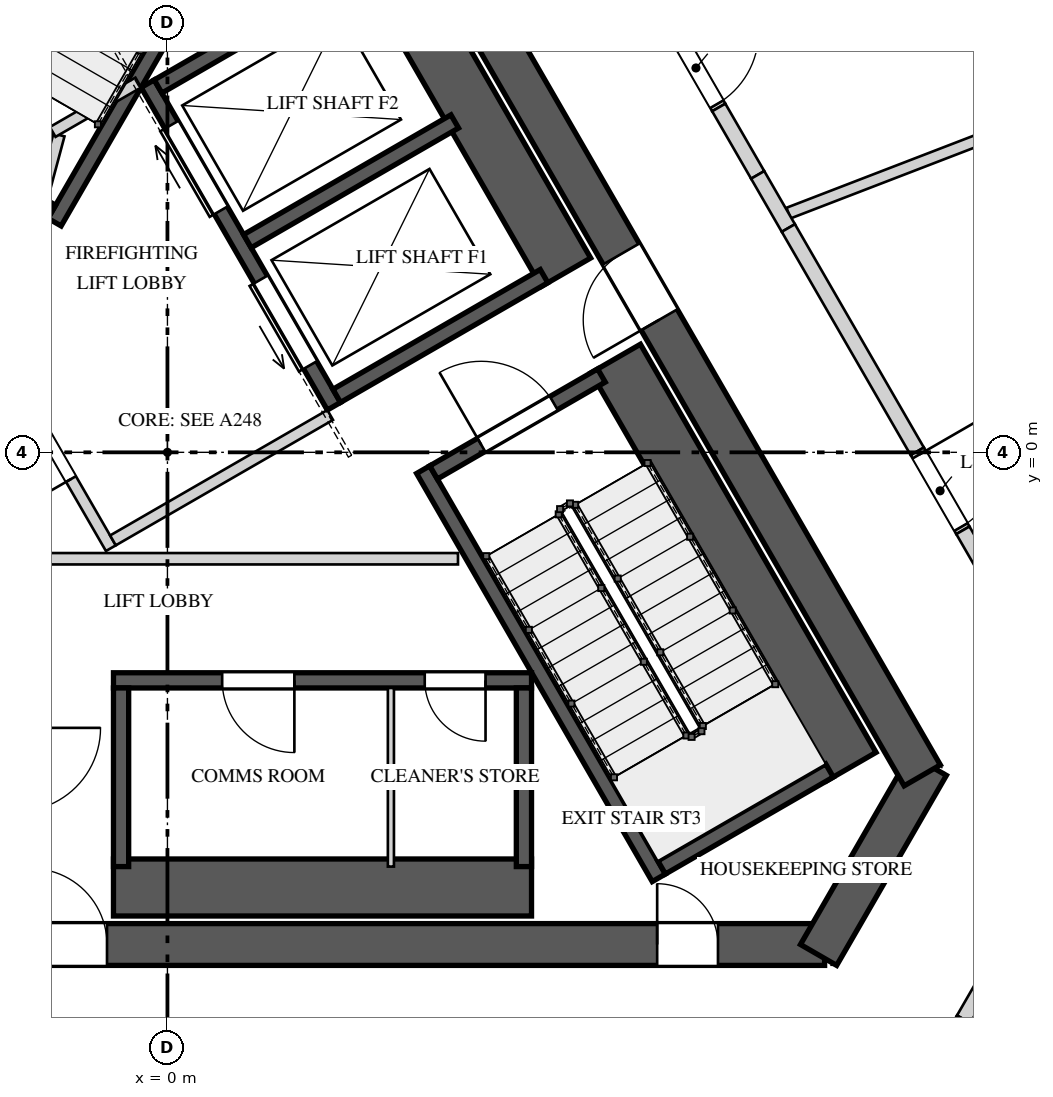
"""IFC4 building model, lengths in metres.
Left out: names, types, materials, properties, quantities, classifications, styles, units other than length and angle.
Written with IfcOpenShell. Run it as: python <this file> out.ifc"""

import sys

from ifc_helpers import new_model, si_unit, direction, frame, frame_2d, origin, place, context, subcontext, project, spatial, polyline, rectangle, outline, extrude, element, fill, save


model = new_model("IFC4")
c1 = context("Model", 3, precision=1e-05, world=origin(), true_north=direction((0.0, 1.0)))
c2 = subcontext(c1, "Body", "Model", "MODEL_VIEW")
j1 = project(units=[si_unit("LENGTHUNIT", "METRE"), si_unit("PLANEANGLEUNIT", "RADIAN")], contexts=[c1])
p1 = place(None, origin())
s1 = spatial("IfcSite", under=j1, at=p1, CompositionType="ELEMENT")
p2 = place(p1, origin())
s2 = spatial("IfcBuilding", under=s1, at=p2, CompositionType="ELEMENT")
p3 = place(p2, frame((0.0, 0.0, 365.9)))
s3 = spatial("IfcBuildingStorey", under=s2, at=p3, CompositionType="ELEMENT", Elevation=365.9)
p4 = place(p3, frame((-1.285, 10.725, 0.0), z_axis=(0.0, 0.0, 1.0), x_axis=(-0.499994590896, -0.86602852671, 0.0)))
e1 = element("IfcWall", 1, at=p4, inside=s3, PredefinedType="SHEAR", context=c2, shape_type="SweptSolid", body=[
    extrude(rectangle(XDim=17.292, YDim=0.55, at=frame_2d((8.646, 0.0))), origin(), (0.0, 0.0, 1.0), 4.5),
])
p5 = place(p4, frame((6.851, 0.0, 0.0)))
e2 = element("IfcOpeningElement", 2, at=p5, cuts=e1, PredefinedType="OPENING", context=c2, shape_type="SweptSolid", body=[
    extrude(rectangle(XDim=1.0, YDim=2.4, at=frame_2d((0.5, 1.2))), frame((0.0, 0.285, 0.0), z_axis=(0.0, -1.0, 0.0), x_axis=(1.0, 0.0, 0.0)), (0.0, 0.0, 1.0), 0.57),
])
p6 = place(p3, frame((-8.646, -6.475, 0.0), z_axis=(0.0, 0.0, 1.0), x_axis=(1.0, 0.0, 0.0)))
e3 = element("IfcWall", 3, at=p6, inside=s3, PredefinedType="SHEAR", context=c2, shape_type="SweptSolid", body=[
    extrude(rectangle(XDim=17.292, YDim=0.55, at=frame_2d((8.646, 0.0))), origin(), (0.0, 0.0, 1.0), 4.5),
])
p7 = place(p6, frame((6.851, 0.0, 0.0)))
e4 = element("IfcOpeningElement", 4, at=p7, cuts=e3, PredefinedType="OPENING", context=c2, shape_type="SweptSolid", body=[
    extrude(rectangle(XDim=1.0, YDim=2.4, at=frame_2d((0.5, 1.2))), frame((0.0, 0.285, 0.0), z_axis=(0.0, -1.0, 0.0), x_axis=(1.0, 0.0, 0.0)), (0.0, 0.0, 1.0), 0.57),
])
p8 = place(p6, frame((15.089, 0.0, 0.0)))
e5 = element("IfcOpeningElement", 5, at=p8, cuts=e3, PredefinedType="OPENING", context=c2, shape_type="SweptSolid", body=[
    extrude(rectangle(XDim=0.8, YDim=2.1, at=frame_2d((0.4, 1.05))), frame((0.0, 0.285, 0.0), z_axis=(0.0, -1.0, 0.0), x_axis=(1.0, 0.0, 0.0)), (0.0, 0.0, 1.0), 0.57),
])
p9 = place(p3, frame((8.566, -6.613, 0.0), z_axis=(0.0, 0.0, 1.0), x_axis=(0.499995765644, 0.866027848477, 0.0)))
e6 = element("IfcWall", 6, at=p9, inside=s3, PredefinedType="SHEAR", context=c2, shape_type="SweptSolid", body=[
    extrude(rectangle(XDim=2.887, YDim=0.55, at=frame_2d((1.443, 0.0))), origin(), (0.0, 0.0, 1.0), 4.5),
])
p10 = place(p3, frame((9.93, -4.25, 0.0), z_axis=(0.0, 0.0, 1.0), x_axis=(-0.499994590896, 0.86602852671, 0.0)))
e7 = element("IfcWall", 7, at=p10, inside=s3, PredefinedType="SHEAR", context=c2, shape_type="SweptSolid", body=[
    extrude(rectangle(XDim=17.292, YDim=0.55, at=frame_2d((8.646, 0.0))), origin(), (0.0, 0.0, 1.0), 4.5),
])
p11 = place(p10, frame((6.921, 0.0, 0.0)))
e8 = element("IfcOpeningElement", 8, at=p11, cuts=e7, PredefinedType="OPENING", context=c2, shape_type="SweptSolid", body=[
    extrude(rectangle(XDim=1.0, YDim=2.4, at=frame_2d((0.5, 1.2))), frame((0.0, 0.285, 0.0), z_axis=(0.0, -1.0, 0.0), x_axis=(1.0, 0.0, 0.0)), (0.0, 0.0, 1.0), 0.57),
])
p12 = place(p10, frame((14.626, 0.0, 0.0)))
e9 = element("IfcOpeningElement", 9, at=p12, cuts=e7, PredefinedType="OPENING", context=c2, shape_type="SweptSolid", body=[
    extrude(rectangle(XDim=0.8, YDim=2.1, at=frame_2d((0.4, 1.05))), frame((0.0, 0.285, 0.0), z_axis=(0.0, -1.0, 0.0), x_axis=(1.0, 0.0, 0.0)), (0.0, 0.0, 1.0), 0.57),
])
p13 = place(p3, frame((-0.918, 9.86, 0.0), z_axis=(0.0, 0.0, 1.0), x_axis=(-0.500026960575, -0.86600983753, 0.0)))
e10 = element("IfcWall", 10, at=p13, inside=s3, PredefinedType="SOLIDWALL", context=c2, shape_type="SweptSolid", body=[
    extrude(rectangle(XDim=6.2, YDim=0.75, at=frame_2d((3.1, 0.0))), origin(), (0.0, 0.0, 1.0), 4.15),
])
p14 = place(p3, frame((1.615, 8.397, 0.0), z_axis=(0.0, 0.0, 1.0), x_axis=(-0.500009909098, -0.866019682689, 0.0)))
e11 = element("IfcWall", 11, at=p14, inside=s3, PredefinedType="SOLIDWALL", context=c2, shape_type="SweptSolid", body=[
    extrude(rectangle(XDim=6.2, YDim=0.2, at=frame_2d((3.1, 0.0))), origin(), (0.0, 0.0, 1.0), 4.15),
])
p15 = place(p3, frame((-1.521, 3.165, 0.0), z_axis=(0.0, 0.0, 1.0), x_axis=(-0.866030925526, 0.499990435942, 0.0)))
e12 = element("IfcWall", 12, at=p15, inside=s3, PredefinedType="SOLIDWALL", context=c2, shape_type="SweptSolid", body=[
    extrude(rectangle(XDim=2.55, YDim=0.2, at=frame_2d((1.275, 0.0))), origin(), (0.0, 0.0, 1.0), 4.15),
])
p16 = place(p15, frame((0.725, 0.0, 0.0)))
e13 = element("IfcOpeningElement", 13, at=p16, cuts=e12, PredefinedType="OPENING", context=c2, shape_type="SweptSolid", body=[
    extrude(rectangle(XDim=1.1, YDim=2.4, at=frame_2d((0.55, 1.2))), frame((0.0, 0.11, 0.0), z_axis=(0.0, -1.0, 0.0), x_axis=(1.0, 0.0, 0.0)), (0.0, 0.0, 1.0), 0.22),
])
p17 = place(p3, frame((8.998, -4.135, 0.0), z_axis=(0.0, 0.0, 1.0), x_axis=(-0.500009909098, 0.866019682689, 0.0)))
e14 = element("IfcWall", 14, at=p17, inside=s3, PredefinedType="SOLIDWALL", context=c2, shape_type="SweptSolid", body=[
    extrude(rectangle(XDim=6.2, YDim=0.75, at=frame_2d((3.1, 0.0))), origin(), (0.0, 0.0, 1.0), 4.15),
])
p18 = place(p3, frame((6.465, -5.597, 0.0), z_axis=(0.0, 0.0, 1.0), x_axis=(-0.49998037582, 0.866036733513, 0.0)))
e15 = element("IfcWall", 15, at=p18, inside=s3, PredefinedType="SOLIDWALL", context=c2, shape_type="SweptSolid", body=[
    extrude(rectangle(XDim=6.2, YDim=0.2, at=frame_2d((3.1, 0.0))), origin(), (0.0, 0.0, 1.0), 4.15),
])
p19 = place(p3, frame((6.501, -5.461, 0.0), z_axis=(0.0, 0.0, 1.0), x_axis=(0.865989465428, 0.500062241894, 0.0)))
e16 = element("IfcWall", 16, at=p19, inside=s3, PredefinedType="SOLIDWALL", context=c2, shape_type="SweptSolid", body=[
    extrude(rectangle(XDim=2.55, YDim=0.2, at=frame_2d((1.275, 0.0))), origin(), (0.0, 0.0, 1.0), 4.15),
])
p20 = place(p3, frame((3.501, -0.265, 0.0), z_axis=(0.0, 0.0, 1.0), x_axis=(0.866030925526, 0.499990435942, 0.0)))
e17 = element("IfcWall", 17, at=p20, inside=s3, PredefinedType="SOLIDWALL", context=c2, shape_type="SweptSolid", body=[
    extrude(rectangle(XDim=2.55, YDim=0.2, at=frame_2d((1.275, 0.0))), origin(), (0.0, 0.0, 1.0), 4.15),
])
p21 = place(p20, frame((0.725, 0.0, 0.0)))
e18 = element("IfcOpeningElement", 18, at=p21, cuts=e17, PredefinedType="OPENING", context=c2, shape_type="SweptSolid", body=[
    extrude(rectangle(XDim=1.1, YDim=2.4, at=frame_2d((0.55, 1.2))), frame((0.0, 0.11, 0.0), z_axis=(0.0, -1.0, 0.0), x_axis=(1.0, 0.0, 0.0)), (0.0, 0.0, 1.0), 0.22),
])
p22 = place(p3, frame((4.79, -3.0, 0.0), z_axis=(0.0, 0.0, 1.0), x_axis=(-1.0, 0.0, 0.0)))
e19 = element("IfcWall", 19, at=p22, inside=s3, PredefinedType="SOLIDWALL", context=c2, shape_type="SweptSolid", body=[
    extrude(rectangle(XDim=5.5, YDim=0.2, at=frame_2d((2.75, 0.0))), origin(), (0.0, 0.0, 1.0), 4.15),
])
p23 = place(p22, frame((3.12, 0.0, 0.0)))
e20 = element("IfcOpeningElement", 20, at=p23, cuts=e19, PredefinedType="OPENING", context=c2, shape_type="SweptSolid", body=[
    extrude(rectangle(XDim=0.95, YDim=2.4, at=frame_2d((0.475, 1.2))), frame((0.0, 0.11, 0.0), z_axis=(0.0, -1.0, 0.0), x_axis=(1.0, 0.0, 0.0)), (0.0, 0.0, 1.0), 0.22),
])
p24 = place(p22, frame((0.605, 0.0, 0.0)))
e21 = element("IfcOpeningElement", 21, at=p24, cuts=e19, PredefinedType="OPENING", context=c2, shape_type="SweptSolid", body=[
    extrude(rectangle(XDim=0.8, YDim=2.1, at=frame_2d((0.4, 1.05))), frame((0.0, 0.11, 0.0), z_axis=(0.0, -1.0, 0.0), x_axis=(1.0, 0.0, 0.0)), (0.0, 0.0, 1.0), 0.22),
])
p25 = place(p3, frame((-0.71, -5.725, 0.0), z_axis=(0.0, 0.0, 1.0), x_axis=(1.0, 0.0, 0.0)))
e22 = element("IfcWall", 22, at=p25, inside=s3, PredefinedType="SOLIDWALL", context=c2, shape_type="SweptSolid", body=[
    extrude(rectangle(XDim=5.5, YDim=0.75, at=frame_2d((2.75, 0.0))), origin(), (0.0, 0.0, 1.0), 4.15),
])
for number, where, z_axis, x_axis in (
    (23, (-0.61, -3.1, 0.0), (0.0, 0.0, 1.0), (0.0, -1.0, 0.0)),
    (24, (4.69, -3.1, 0.0), (0.0, 0.0, 1.0), (0.0, -1.0, 0.0)),
):
    element("IfcWall", number, at=place(p3, frame(where, z_axis=z_axis, x_axis=x_axis)), inside=s3, PredefinedType="SOLIDWALL", context=c2, shape_type="SweptSolid", body=[
        extrude(rectangle(XDim=2.35, YDim=0.2, at=frame_2d((1.175, 0.0))), origin(), (0.0, 0.0, 1.0), 4.15),
    ])
p26 = place(p3, frame((2.94, -3.1, 0.0), z_axis=(0.0, 0.0, 1.0), x_axis=(0.0, -1.0, 0.0)))
e25 = element("IfcWall", 25, at=p26, inside=s3, PredefinedType="PARTITIONING", context=c2, shape_type="SweptSolid", body=[
    extrude(rectangle(XDim=2.35, YDim=0.08, at=frame_2d((1.175, 0.0))), origin(), (0.0, 0.0, 1.0), 4.15),
])
p27 = place(p3, frame((2.19, 0.606, 0.0), z_axis=(0.0, 0.0, 1.0), x_axis=(-0.500002801628, 0.866023786258, 0.0)))
e26 = element("IfcWall", 26, at=p27, inside=s3, PredefinedType="SOLIDWALL", context=c2, shape_type="SweptSolid", body=[
    extrude(rectangle(XDim=4.9, YDim=0.2, at=frame_2d((2.45, 0.0))), origin(), (0.0, 0.0, 1.0), 4.15),
])
p28 = place(p27, frame((0.625, 0.0, 0.0)))
e27 = element("IfcOpeningElement", 27, at=p28, cuts=e26, PredefinedType="OPENING", context=c2, shape_type="SweptSolid", body=[
    extrude(rectangle(XDim=1.3, YDim=2.1, at=frame_2d((0.65, 1.05))), frame((0.0, 0.11, 0.0), z_axis=(0.0, -1.0, 0.0), x_axis=(1.0, 0.0, 0.0)), (0.0, 0.0, 1.0), 0.22),
])
p29 = place(p27, frame((2.975, 0.0, 0.0)))
e28 = element("IfcOpeningElement", 28, at=p29, cuts=e26, PredefinedType="OPENING", context=c2, shape_type="SweptSolid", body=[
    extrude(rectangle(XDim=1.3, YDim=2.1, at=frame_2d((0.65, 1.05))), frame((0.0, 0.11, 0.0), z_axis=(0.0, -1.0, 0.0), x_axis=(1.0, 0.0, 0.0)), (0.0, 0.0, 1.0), 0.22),
])
p30 = place(p3, frame((5.243, 2.369, 0.0), z_axis=(0.0, 0.0, 1.0), x_axis=(-0.500002801628, 0.866023786258, 0.0)))
e29 = element("IfcWall", 29, at=p30, inside=s3, PredefinedType="SOLIDWALL", context=c2, shape_type="SweptSolid", body=[
    extrude(rectangle(XDim=4.9, YDim=0.75, at=frame_2d((2.45, 0.0))), origin(), (0.0, 0.0, 1.0), 4.15),
])
for number, where, z_axis, x_axis in (
    (30, (2.227, 0.743, 0.0), (0.0, 0.0, 1.0), (0.866, 0.5, 0.0)),
    (31, (1.052, 2.778, 0.0), (0.0, 0.0, 1.0), (0.866, 0.5, 0.0)),
    (32, (-0.123, 4.813, 0.0), (0.0, 0.0, 1.0), (0.866, 0.5, 0.0)),
):
    element("IfcWall", number, at=place(p3, frame(where, z_axis=z_axis, x_axis=x_axis)), inside=s3, PredefinedType="SOLIDWALL", context=c2, shape_type="SweptSolid", body=[
        extrude(rectangle(XDim=3.15, YDim=0.2, at=frame_2d((1.575, 0.0))), origin(), (0.0, 0.0, 1.0), 4.15),
    ])
p31 = place(p3, frame((-0.744, -1.261, 0.0), z_axis=(0.0, 0.0, 1.0), x_axis=(-0.500004234368, 0.866022959057, 0.0)))
e33 = element("IfcWall", 33, at=p31, inside=s3, PredefinedType="PARTITIONING", context=c2, shape_type="SweptSolid", body=[
    extrude(rectangle(XDim=3.125, YDim=0.15, at=frame_2d((1.562, 0.0))), origin(), (0.0, 0.0, 1.0), 4.15),
])
p32 = place(p31, frame((1.05, 0.0, 0.0)))
e34 = element("IfcOpeningElement", 34, at=p32, cuts=e33, PredefinedType="OPENING", context=c2, shape_type="SweptSolid", body=[
    extrude(rectangle(XDim=1.1, YDim=2.4, at=frame_2d((0.55, 1.2))), frame((0.0, 0.085, 0.0), z_axis=(0.0, -1.0, 0.0), x_axis=(1.0, 0.0, 0.0)), (0.0, 0.0, 1.0), 0.17),
])
p33 = place(p3, frame((-0.717, -1.159, 0.0), z_axis=(0.0, 0.0, 1.0), x_axis=(0.866008176907, 0.50002983664, 0.0)))
e35 = element("IfcWall", 35, at=p33, inside=s3, PredefinedType="PARTITIONING", context=c2, shape_type="SweptSolid", body=[
    extrude(rectangle(XDim=3.3, YDim=0.15, at=frame_2d((1.65, 0.0))), origin(), (0.0, 0.0, 1.0), 4.15),
])
p34 = place(p3, frame((-2.178, 1.372, 0.0), z_axis=(0.0, 0.0, 1.0), x_axis=(0.258808958833, 0.96592852884, 0.0)))
e36 = element("IfcWall", 36, at=p34, inside=s3, PredefinedType="PARTITIONING", context=c2, shape_type="SweptSolid", body=[
    extrude(rectangle(XDim=2.903, YDim=0.15, at=frame_2d((1.451, 0.0))), origin(), (0.0, 0.0, 1.0), 4.15),
])
p35 = place(p3, frame((-1.51, 4.215, 0.0), z_axis=(0.0, 0.0, 1.0), x_axis=(0.866085525409, 0.49989585183, 0.0)))
e37 = element("IfcWall", 37, at=p35, inside=s3, PredefinedType="PARTITIONING", context=c2, shape_type="SweptSolid", body=[
    extrude(rectangle(XDim=1.3, YDim=0.15, at=frame_2d((0.65, 0.0))), origin(), (0.0, 0.0, 1.0), 4.15),
])
p36 = place(p3, frame((-4.053, -1.4, 0.0), z_axis=(0.0, 0.0, 1.0), x_axis=(1.0, 0.0, 0.0)))
e38 = element("IfcWall", 38, at=p36, inside=s3, PredefinedType="PARTITIONING", context=c2, shape_type="SweptSolid", body=[
    extrude(rectangle(XDim=7.876, YDim=0.15, at=frame_2d((3.938, 0.0))), origin(), (0.0, 0.0, 1.0), 4.15),
])
p37 = place(p3, frame((12.8, 4.93, 0.0), z_axis=(0.0, 0.0, 1.0), x_axis=(-0.933162813033, -0.359453980884, 0.0)))
e39 = element("IfcWall", 39, at=p37, inside=s3, PredefinedType="PARTITIONING", context=c2, shape_type="SweptSolid", body=[
    extrude(rectangle(XDim=4.96, YDim=0.15, at=frame_2d((2.48, 0.0))), origin(), (0.0, 0.0, 1.0), 3.25),
])
p38 = place(p3, frame((10.825, -6.851, 0.0), z_axis=(0.0, 0.0, 1.0), x_axis=(-0.500144223137, -0.865942120504, 0.0)))
e40 = element("IfcWall", 40, at=p38, inside=s3, PredefinedType="SOLIDWALL", context=c2, shape_type="SweptSolid", body=[
    extrude(rectangle(XDim=0.701, YDim=0.2, at=frame_2d((0.351, 0.0))), origin(), (0.0, 0.0, 1.0), 3.45),
])
p39 = place(p3, frame((10.474, -7.458, 0.0), z_axis=(0.0, 0.0, 1.0), x_axis=(-0.499929168788, -0.866066294342, 0.0)))
e41 = element("IfcWall", 41, at=p39, inside=s3, PredefinedType="SOLIDWALL", context=c2, shape_type="SweptSolid", body=[
    extrude(rectangle(XDim=1.261, YDim=0.2, at=frame_2d((0.63, 0.0))), origin(), (0.0, 0.0, 1.0), 4.15),
])
p40 = place(p3, frame((6.653, 5.576, 0.0), z_axis=(0.0, 0.0, 1.0), x_axis=(0.499880961361, -0.866094119867, 0.0)))
e42 = element("IfcWall", 42, at=p40, inside=s3, PredefinedType="SOLIDWALL", context=c2, shape_type="SweptSolid", body=[
    extrude(outline(polyline([(0.0, 0.0), (1.2, 0.0), (1.2, 4.15), (0.986, 4.15), (0.986, 3.05), (0.0, 3.05), (0.0, 0.0)])), frame((0.0, 0.1, 0.0), z_axis=(0.0, -1.0, 0.0), x_axis=(1.0, 0.0, 0.0)), (0.0, 0.0, 1.0), 0.2),
])
p41 = place(p40, frame((0.05, 0.0, 0.0)))
e43 = element("IfcOpeningElement", 43, at=p41, cuts=e42, PredefinedType="OPENING", context=c2, shape_type="SweptSolid", body=[
    extrude(rectangle(XDim=1.1, YDim=2.4, at=frame_2d((0.55, 1.2))), frame((0.0, 0.11, 0.0), z_axis=(0.0, -1.0, 0.0), x_axis=(1.0, 0.0, 0.0)), (0.0, 0.0, 1.0), 0.22),
])
p42 = place(p3, frame((7.253, 4.537, 0.0), z_axis=(0.0, 0.0, 1.0), x_axis=(0.500086965421, -0.865975188453, 0.0)))
e44 = element("IfcWall", 44, at=p42, inside=s3, PredefinedType="SOLIDWALL", context=c2, shape_type="SweptSolid", body=[
    extrude(rectangle(XDim=1.024, YDim=0.2, at=frame_2d((0.512, 0.0))), origin(), (0.0, 0.0, 1.0), 4.15),
])
p43 = place(p3, frame((7.765, 3.65, 0.0), z_axis=(0.0, 0.0, 1.0), x_axis=(0.500141487433, -0.865943700565, 0.0)))
e45 = element("IfcWall", 45, at=p43, inside=s3, PredefinedType="SOLIDWALL", context=c2, shape_type="SweptSolid", body=[
    extrude(rectangle(XDim=0.807, YDim=0.2, at=frame_2d((0.403, 0.0))), origin(), (0.0, 0.0, 1.0), 3.25),
])
p44 = place(p3, frame((8.169, 2.951, 0.0), z_axis=(0.0, 0.0, 1.0), x_axis=(0.499955030392, -0.866051365443, 0.0)))
e46 = element("IfcWall", 46, at=p44, inside=s3, PredefinedType="SOLIDWALL", context=c2, shape_type="SweptSolid", body=[
    extrude(rectangle(XDim=3.392, YDim=0.2, at=frame_2d((1.696, 0.0))), origin(), (0.0, 0.0, 1.0), 4.15),
])
p45 = place(p3, frame((9.865, 0.013, 0.0), z_axis=(0.0, 0.0, 1.0), x_axis=(0.50012165622, -0.865955154139, 0.0)))
e47 = element("IfcWall", 47, at=p45, inside=s3, PredefinedType="SOLIDWALL", context=c2, shape_type="SweptSolid", body=[
    extrude(outline(polyline([(0.0, 0.0), (1.2, 0.0), (1.2, 4.15), (0.857, 4.15), (0.857, 3.45), (0.0, 3.45), (0.0, 0.0)])), frame((0.0, 0.1, 0.0), z_axis=(0.0, -1.0, 0.0), x_axis=(1.0, 0.0, 0.0)), (0.0, 0.0, 1.0), 0.2),
])
p46 = place(p45, frame((0.05, 0.0, 0.0)))
e48 = element("IfcOpeningElement", 48, at=p46, cuts=e47, PredefinedType="OPENING", context=c2, shape_type="SweptSolid", body=[
    extrude(rectangle(XDim=1.1, YDim=2.4, at=frame_2d((0.55, 1.2))), frame((0.0, 0.11, 0.0), z_axis=(0.0, -1.0, 0.0), x_axis=(1.0, 0.0, 0.0)), (0.0, 0.0, 1.0), 0.22),
])
p47 = place(p3, frame((10.465, -1.026, 0.0), z_axis=(0.0, 0.0, 1.0), x_axis=(0.499976014784, -0.866039251212, 0.0)))
e49 = element("IfcWall", 49, at=p47, inside=s3, PredefinedType="SOLIDWALL", context=c2, shape_type="SweptSolid", body=[
    extrude(rectangle(XDim=3.723, YDim=0.2, at=frame_2d((1.861, 0.0))), origin(), (0.0, 0.0, 1.0), 4.15),
])
p48 = place(p21, origin())
e50 = element("IfcDoor", 50, at=p48, inside=s3, OperationType="SINGLE_SWING_RIGHT", PredefinedType="DOOR", context=c2, shape_type="SweptSolid", body=[
    extrude(rectangle(XDim=1.1, YDim=2.4, at=frame_2d((0.55, 1.2))), frame((0.0, 0.025, 0.0), z_axis=(0.0, -1.0, 0.0), x_axis=(1.0, 0.0, 0.0)), (0.0, 0.0, 1.0), 0.05),
])
fill(e18, e50)
p49 = place(p23, origin())
e51 = element("IfcDoor", 51, at=p49, inside=s3, OperationType="SINGLE_SWING_LEFT", PredefinedType="DOOR", context=c2, shape_type="SweptSolid", body=[
    extrude(rectangle(XDim=0.95, YDim=2.4, at=frame_2d((0.475, 1.2))), frame((0.0, 0.025, 0.0), z_axis=(0.0, -1.0, 0.0), x_axis=(1.0, 0.0, 0.0)), (0.0, 0.0, 1.0), 0.05),
])
fill(e20, e51)
p50 = place(p24, origin())
e52 = element("IfcDoor", 52, at=p50, inside=s3, OperationType="SINGLE_SWING_RIGHT", PredefinedType="DOOR", context=c2, shape_type="SweptSolid", body=[
    extrude(rectangle(XDim=0.8, YDim=2.1, at=frame_2d((0.4, 1.05))), frame((0.0, 0.025, 0.0), z_axis=(0.0, -1.0, 0.0), x_axis=(1.0, 0.0, 0.0)), (0.0, 0.0, 1.0), 0.05),
])
fill(e21, e52)
p51 = place(p28, origin())
e53 = element("IfcDoor", 53, at=p51, inside=s3, OperationType="SLIDING_TO_LEFT", PredefinedType="DOOR", context=c2, shape_type="SweptSolid", body=[
    extrude(rectangle(XDim=1.3, YDim=2.1, at=frame_2d((0.65, 1.05))), frame((0.0, 0.025, 0.0), z_axis=(0.0, -1.0, 0.0), x_axis=(1.0, 0.0, 0.0)), (0.0, 0.0, 1.0), 0.05),
])
fill(e27, e53)
p52 = place(p29, origin())
e54 = element("IfcDoor", 54, at=p52, inside=s3, OperationType="SLIDING_TO_RIGHT", PredefinedType="DOOR", context=c2, shape_type="SweptSolid", body=[
    extrude(rectangle(XDim=1.3, YDim=2.1, at=frame_2d((0.65, 1.05))), frame((0.0, 0.025, 0.0), z_axis=(0.0, -1.0, 0.0), x_axis=(1.0, 0.0, 0.0)), (0.0, 0.0, 1.0), 0.05),
])
fill(e28, e54)
p53 = place(p32, origin())
e55 = element("IfcDoor", 55, at=p53, inside=s3, OperationType="SINGLE_SWING_LEFT", PredefinedType="DOOR", context=c2, shape_type="SweptSolid", body=[
    extrude(rectangle(XDim=1.1, YDim=2.4, at=frame_2d((0.55, 1.2))), frame((0.0, 0.025, 0.0), z_axis=(0.0, -1.0, 0.0), x_axis=(1.0, 0.0, 0.0)), (0.0, 0.0, 1.0), 0.05),
])
fill(e34, e55)
p54 = place(p7, origin())
e56 = element("IfcDoor", 56, at=p54, inside=s3, OperationType="SINGLE_SWING_LEFT", PredefinedType="DOOR", context=c2, shape_type="SweptSolid", body=[
    extrude(rectangle(XDim=1.0, YDim=2.4, at=frame_2d((0.5, 1.2))), frame((0.0, 0.025, 0.0), z_axis=(0.0, -1.0, 0.0), x_axis=(1.0, 0.0, 0.0)), (0.0, 0.0, 1.0), 0.05),
])
fill(e4, e56)
p55 = place(p11, origin())
e57 = element("IfcDoor", 57, at=p55, inside=s3, OperationType="SINGLE_SWING_RIGHT", PredefinedType="DOOR", context=c2, shape_type="SweptSolid", body=[
    extrude(rectangle(XDim=1.0, YDim=2.4, at=frame_2d((0.5, 1.2))), frame((0.0, 0.025, 0.0), z_axis=(0.0, -1.0, 0.0), x_axis=(1.0, 0.0, 0.0)), (0.0, 0.0, 1.0), 0.05),
])
fill(e8, e57)
p56 = place(p8, origin())
e58 = element("IfcDoor", 58, at=p56, inside=s3, OperationType="SINGLE_SWING_LEFT", PredefinedType="DOOR", context=c2, shape_type="SweptSolid", body=[
    extrude(rectangle(XDim=0.8, YDim=2.1, at=frame_2d((0.4, 1.05))), frame((0.0, 0.025, 0.0), z_axis=(0.0, -1.0, 0.0), x_axis=(1.0, 0.0, 0.0)), (0.0, 0.0, 1.0), 0.05),
])
fill(e5, e58)
p57 = place(p41, origin())
e59 = element("IfcDoor", 59, at=p57, inside=s3, OperationType="SINGLE_SWING_LEFT", PredefinedType="DOOR", context=c2, shape_type="SweptSolid", body=[
    extrude(rectangle(XDim=1.1, YDim=2.4, at=frame_2d((0.55, 1.2))), frame((0.0, 0.025, 0.0), z_axis=(0.0, -1.0, 0.0), x_axis=(1.0, 0.0, 0.0)), (0.0, 0.0, 1.0), 0.05),
])
fill(e43, e59)
p58 = place(p46, origin())
e60 = element("IfcDoor", 60, at=p58, inside=s3, OperationType="SINGLE_SWING_RIGHT", PredefinedType="DOOR", context=c2, shape_type="SweptSolid", body=[
    extrude(rectangle(XDim=1.1, YDim=2.4, at=frame_2d((0.55, 1.2))), frame((0.0, 0.025, 0.0), z_axis=(0.0, -1.0, 0.0), x_axis=(1.0, 0.0, 0.0)), (0.0, 0.0, 1.0), 0.05),
])
fill(e48, e60)
save(model, sys.argv[1])
